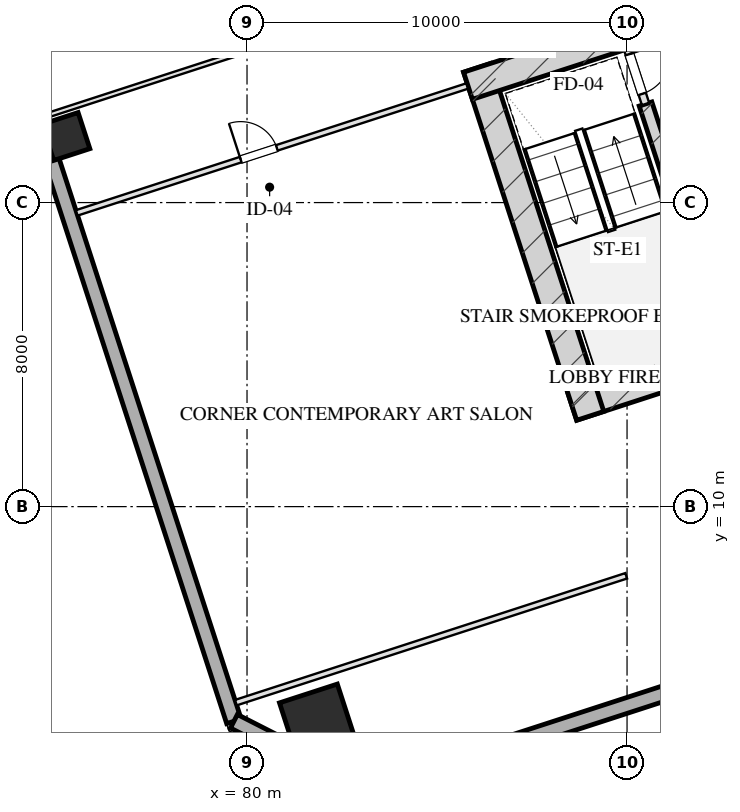
"""IFC4 building model, lengths in metres.
Left out: names, types, materials, properties, quantities, classifications, styles, units other than length and angle.
Written with IfcOpenShell. Run it as: python <this file> out.ifc"""

import sys

from ifc_helpers import new_model, si_unit, direction, frame, frame_2d, origin, origin_2d, place, context, subcontext, project, spatial, rectangle, hollow_rectangle, extrude, element, fill, save


model = new_model("IFC4")
c1 = context("Model", 3, precision=1e-05, world=origin(), true_north=direction((0.0, 1.0)))
c2 = subcontext(c1, "Body", "Model", "MODEL_VIEW")
j1 = project(units=[si_unit("LENGTHUNIT", "METRE"), si_unit("PLANEANGLEUNIT", "RADIAN")], contexts=[c1])
p1 = place(None, origin())
s1 = spatial("IfcSite", under=j1, at=p1, CompositionType="ELEMENT")
p2 = place(p1, origin())
s2 = spatial("IfcBuilding", under=s1, at=p2, CompositionType="ELEMENT")
p3 = place(p2, frame((0.0, 0.0, 54.05)))
s3 = spatial("IfcBuildingStorey", under=s2, at=p3, CompositionType="ELEMENT", Elevation=54.05)
p4 = place(p3, frame((88.559, 12.629, 0.0), z_axis=(0.0, 0.0, 1.0), x_axis=(0.951056072937, 0.309018358888, 0.0)))
e1 = element("IfcWall", 1, at=p4, inside=s3, PredefinedType="SHEAR", context=c2, shape_type="SweptSolid", body=[
    extrude(rectangle(XDim=16.55, YDim=0.75, at=frame_2d((8.275, 0.0))), origin(), (0.0, 0.0, 1.0), 3.45),
])
p5 = place(p3, frame((86.055, 21.546, 0.0), z_axis=(0.0, 0.0, 1.0), x_axis=(0.309023585745, -0.951054374604, 0.0)))
e2 = element("IfcWall", 2, at=p5, inside=s3, PredefinedType="SHEAR", context=c2, shape_type="SweptSolid", body=[
    extrude(rectangle(XDim=9.63, YDim=0.75, at=frame_2d((4.815, 0.0))), origin(), (0.0, 0.0, 1.0), 3.45),
])
p6 = place(p3, frame((90.486, 20.594, 0.0), z_axis=(0.0, 0.0, 1.0), x_axis=(0.309020428229, -0.951055400562, 0.0)))
e3 = element("IfcWall", 3, at=p6, inside=s3, PredefinedType="SHEAR", context=c2, shape_type="SweptSolid", body=[
    extrude(rectangle(XDim=6.98, YDim=0.35, at=frame_2d((3.49, 0.0))), origin(), (0.0, 0.0, 1.0), 3.45),
])
p7 = place(p3, frame((85.814, 21.074, 0.0), z_axis=(0.0, 0.0, 1.0), x_axis=(0.95106580992, 0.308988390074, 0.0)))
e4 = element("IfcWall", 4, at=p7, inside=s3, PredefinedType="SHEAR", context=c2, shape_type="SweptSolid", body=[
    extrude(rectangle(XDim=4.295, YDim=0.75, at=frame_2d((2.147, 0.0))), origin(), (0.0, 0.0, 1.0), 3.45),
])
p8 = place(p3, frame((81.863, 4.323, 0.0), z_axis=(0.0, 0.0, 1.0), x_axis=(0.951056516295, 0.309016994375, 0.0)))
e5 = element("IfcColumn", 5, at=p8, inside=s3, PredefinedType="COLUMN", context=c2, shape_type="SweptSolid", body=[
    extrude(hollow_rectangle(XDim=1.6, YDim=1.6, WallThickness=0.055, at=origin_2d()), origin(), (0.0, 0.0, 1.0), 3.451),
])
p9 = place(p3, frame((75.234, 19.739, 0.0), z_axis=(0.0, 0.0, 1.0), x_axis=(0.951056516295, 0.309016994375, 0.0)))
e6 = element("IfcColumn", 6, at=p9, inside=s3, PredefinedType="COLUMN", context=c2, shape_type="SweptSolid", body=[
    extrude(hollow_rectangle(XDim=1.0, YDim=1.0, WallThickness=0.036, at=origin_2d()), origin(), (0.0, 0.0, 1.0), 3.451),
])
p10 = place(p3, frame((79.655, 4.352, 0.0), z_axis=(0.0, 0.0, 1.0), x_axis=(-0.309014526607, 0.951057318118, 0.0)))
e7 = element("IfcWall", 7, at=p10, inside=s3, PredefinedType="SOLIDWALL", context=c2, shape_type="SweptSolid", body=[
    extrude(rectangle(XDim=50.0, YDim=0.4, at=frame_2d((25.0, 0.0))), origin(), (0.0, 0.0, 1.0), 2.61),
])
p11 = place(p10, frame((17.35, 0.0, 0.75)))
e8 = element("IfcOpeningElement", 8, at=p11, cuts=e7, PredefinedType="OPENING", context=c2, shape_type="SweptSolid", body=[
    extrude(rectangle(XDim=2.5, YDim=1.46, at=frame_2d((1.25, 0.73))), frame((0.0, 0.21, 0.0), z_axis=(0.0, -1.0, 0.0), x_axis=(1.0, 0.0, 0.0)), (0.0, 0.0, 1.0), 0.42),
])
p12 = place(p10, frame((30.15, 0.0, 0.75)))
e9 = element("IfcOpeningElement", 9, at=p12, cuts=e7, PredefinedType="OPENING", context=c2, shape_type="SweptSolid", body=[
    extrude(rectangle(XDim=2.5, YDim=1.46, at=frame_2d((1.25, 0.73))), frame((0.0, 0.21, 0.0), z_axis=(0.0, -1.0, 0.0), x_axis=(1.0, 0.0, 0.0)), (0.0, 0.0, 1.0), 0.42),
])
p13 = place(p3, frame((113.998, 12.567, 0.0), z_axis=(0.0, 0.0, 1.0), x_axis=(-0.951055939317, -0.309018770125, 0.0)))
e10 = element("IfcWall", 10, at=p13, inside=s3, PredefinedType="SOLIDWALL", context=c2, shape_type="SweptSolid", body=[
    extrude(rectangle(XDim=32.4, YDim=0.4, at=frame_2d((16.2, 0.0))), origin(), (0.0, 0.0, 1.0), 2.61),
])
p14 = place(p3, frame((83.184, 2.554, 0.0), z_axis=(0.0, 0.0, 1.0), x_axis=(-0.890998089617, 0.454007053137, 0.0)))
e11 = element("IfcWall", 11, at=p14, inside=s3, PredefinedType="SOLIDWALL", context=c2, shape_type="SweptSolid", body=[
    extrude(rectangle(XDim=3.96, YDim=0.4, at=frame_2d((1.98, 0.0))), origin(), (0.0, 0.0, 1.0), 2.61),
])
p15 = place(p3, frame((89.899, 22.401, 0.0), z_axis=(0.0, 0.0, 1.0), x_axis=(0.308932062672, -0.951084108086, 0.0)))
e12 = element("IfcWall", 12, at=p15, inside=s3, PredefinedType="PARTITIONING", context=c2, shape_type="SweptSolid", body=[
    extrude(rectangle(XDim=1.9, YDim=0.2, at=frame_2d((0.95, 0.0))), origin(), (0.0, 0.0, 1.0), 3.175),
])
p16 = place(p15, frame((0.52, 0.0, 0.0)))
e13 = element("IfcOpeningElement", 13, at=p16, cuts=e12, PredefinedType="OPENING", context=c2, shape_type="SweptSolid", body=[
    extrude(rectangle(XDim=1.1, YDim=2.05, at=frame_2d((0.55, 1.025))), frame((0.0, 0.11, 0.0), z_axis=(0.0, -1.0, 0.0), x_axis=(1.0, 0.0, 0.0)), (0.0, 0.0, 1.0), 0.22),
])
p17 = place(p3, frame((79.707, 4.842, 0.0), z_axis=(0.0, 0.0, 1.0), x_axis=(0.951056658866, 0.309016555588, 0.0)))
e14 = element("IfcWall", 14, at=p17, inside=s3, PredefinedType="PARTITIONING", context=c2, shape_type="SweptSolid", body=[
    extrude(rectangle(XDim=10.8, YDim=0.15, at=frame_2d((5.4, 0.0))), origin(), (0.0, 0.0, 1.0), 3.175),
])
p18 = place(p3, frame((75.519, 17.729, 0.0), z_axis=(0.0, 0.0, 1.0), x_axis=(0.951056658866, 0.309016555588, 0.0)))
e15 = element("IfcWall", 15, at=p18, inside=s3, PredefinedType="PARTITIONING", context=c2, shape_type="SweptSolid", body=[
    extrude(rectangle(XDim=10.8, YDim=0.15, at=frame_2d((5.4, 0.0))), origin(), (0.0, 0.0, 1.0), 3.175),
])
p19 = place(p18, frame((4.536, 0.0, 0.0)))
e16 = element("IfcOpeningElement", 16, at=p19, cuts=e15, PredefinedType="OPENING", context=c2, shape_type="SweptSolid", body=[
    extrude(rectangle(XDim=1.0, YDim=2.05, at=frame_2d((0.5, 1.025))), frame((0.0, 0.085, 0.0), z_axis=(0.0, -1.0, 0.0), x_axis=(1.0, 0.0, 0.0)), (0.0, 0.0, 1.0), 0.17),
])
p20 = place(p3, frame((74.691, 20.278, 0.0), z_axis=(0.0, 0.0, 1.0), x_axis=(0.951054756643, 0.309022409974, 0.0)))
e17 = element("IfcWall", 17, at=p20, inside=s3, PredefinedType="PARTITIONING", context=c2, shape_type="SweptSolid", body=[
    extrude(rectangle(XDim=15.175, YDim=0.12, at=frame_2d((7.587, 0.0))), origin(), (0.0, 0.0, 1.0), 3.175),
])
p21 = place(p16, origin())
e18 = element("IfcDoor", 18, at=p21, inside=s3, OperationType="SINGLE_SWING_LEFT", PredefinedType="DOOR", context=c2, shape_type="SweptSolid", body=[
    extrude(rectangle(XDim=1.1, YDim=2.05, at=frame_2d((0.55, 1.025))), frame((0.0, 0.025, 0.0), z_axis=(0.0, -1.0, 0.0), x_axis=(1.0, 0.0, 0.0)), (0.0, 0.0, 1.0), 0.05),
])
fill(e13, e18)
p22 = place(p19, origin())
e19 = element("IfcDoor", 19, at=p22, inside=s3, OperationType="SINGLE_SWING_LEFT", PredefinedType="DOOR", context=c2, shape_type="SweptSolid", body=[
    extrude(rectangle(XDim=1.0, YDim=2.05, at=frame_2d((0.5, 1.025))), frame((0.0, 0.025, 0.0), z_axis=(0.0, -1.0, 0.0), x_axis=(1.0, 0.0, 0.0)), (0.0, 0.0, 1.0), 0.05),
])
fill(e16, e19)
save(model, sys.argv[1])
